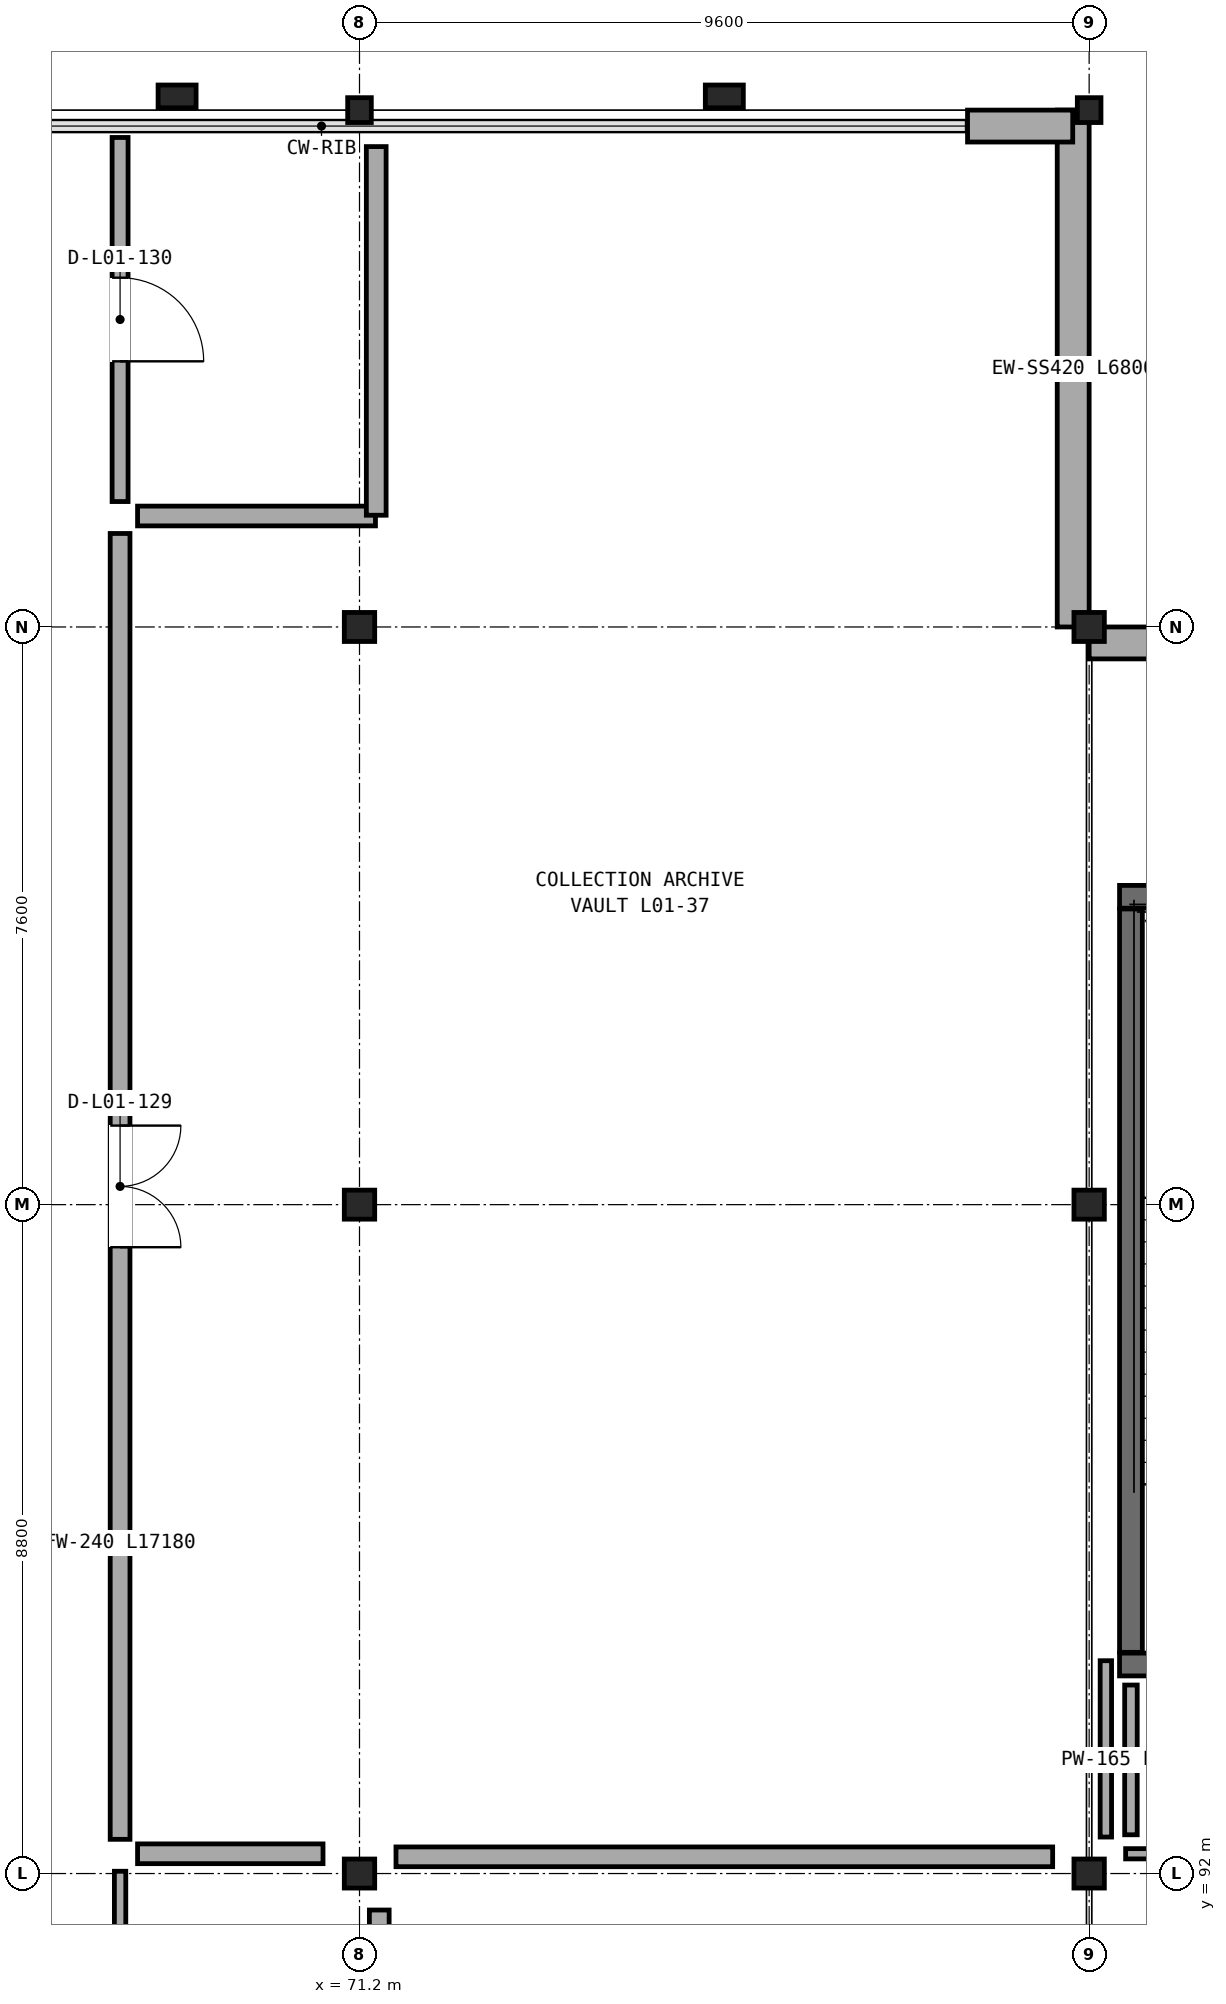
"""IFC4 building model, lengths in metres.
Left out: names, types, materials, properties, quantities, classifications, styles, units other than length and angle.
Written with IfcOpenShell. Run it as: python <this file> out.ifc"""

import sys

from ifc_helpers import new_model, si_unit, direction, frame, frame_2d, origin, origin_2d, place, context, subcontext, project, spatial, rectangle, i_section, extrude, element, fill, save


model = new_model("IFC4")
c1 = context("Model", 3, precision=1e-05, world=origin(), true_north=direction((0.0, 1.0)))
c2 = subcontext(c1, "Body", "Model", "MODEL_VIEW")
j1 = project(units=[si_unit("LENGTHUNIT", "METRE"), si_unit("PLANEANGLEUNIT", "RADIAN")], contexts=[c1])
p1 = place(None, origin())
s1 = spatial("IfcSite", under=j1, at=p1, CompositionType="ELEMENT")
p2 = place(p1, origin())
s2 = spatial("IfcBuilding", under=s1, at=p2, CompositionType="ELEMENT")
p3 = place(p2, frame((0.0, 0.0, 5.6)))
s3 = spatial("IfcBuildingStorey", under=s2, at=p3, CompositionType="ELEMENT", Elevation=5.6)
for number, where, z_axis, x_axis in (
    (1, (71.2, 92.0, 0.0), (0.0, 0.0, 1.0), (1.0, 0.0, 0.0)),
    (2, (71.2, 100.8, 0.0), (0.0, 0.0, 1.0), (1.0, 0.0, 0.0)),
    (3, (71.2, 108.4, 0.0), (0.0, 0.0, 1.0), (1.0, 0.0, 0.0)),
):
    element("IfcColumn", number, at=place(p3, frame(where, z_axis=z_axis, x_axis=x_axis)), inside=s3, PredefinedType="COLUMN", context=c2, shape_type="SweptSolid", body=[
        extrude(i_section(OverallWidth=0.4, OverallDepth=0.382, WebThickness=0.025, FlangeThickness=0.036, at=origin_2d()), origin(), (0.0, 0.0, 1.0), 4.5),
    ])
p4 = place(p3, frame((71.2, 115.2, 0.0), z_axis=(0.0, 0.0, 1.0), x_axis=(1.0, 0.0, 0.0)))
e4 = element("IfcColumn", 4, at=p4, inside=s3, PredefinedType="COLUMN", context=c2, shape_type="SweptSolid", body=[
    extrude(i_section(OverallWidth=0.311, OverallDepth=0.327, WebThickness=0.016, FlangeThickness=0.025, FilletRadius=0.017, at=origin_2d()), origin(), (0.0, 0.0, 1.0), 4.5),
])
for number, where, z_axis, x_axis in (
    (5, (80.8, 92.0, 0.0), (0.0, 0.0, 1.0), (1.0, 0.0, 0.0)),
    (6, (80.8, 100.8, 0.0), (0.0, 0.0, 1.0), (1.0, 0.0, 0.0)),
    (7, (80.8, 108.4, 0.0), (0.0, 0.0, 1.0), (1.0, 0.0, 0.0)),
):
    element("IfcColumn", number, at=place(p3, frame(where, z_axis=z_axis, x_axis=x_axis)), inside=s3, PredefinedType="COLUMN", context=c2, shape_type="SweptSolid", body=[
        extrude(i_section(OverallWidth=0.4, OverallDepth=0.382, WebThickness=0.025, FlangeThickness=0.036, at=origin_2d()), origin(), (0.0, 0.0, 1.0), 4.5),
    ])
p5 = place(p3, frame((80.8, 115.2, 0.0), z_axis=(0.0, 0.0, 1.0), x_axis=(1.0, 0.0, 0.0)))
e8 = element("IfcColumn", 8, at=p5, inside=s3, PredefinedType="COLUMN", context=c2, shape_type="SweptSolid", body=[
    extrude(i_section(OverallWidth=0.311, OverallDepth=0.327, WebThickness=0.016, FlangeThickness=0.025, FilletRadius=0.017, at=origin_2d()), origin(), (0.0, 0.0, 1.0), 4.5),
])
for number, where, z_axis, x_axis in (
    (9, (68.8, 115.38, 0.0), (0.0, 0.0, 1.0), (1.0, 0.0, 0.0)),
    (10, (76.0, 115.38, 0.0), (0.0, 0.0, 1.0), (1.0, 0.0, 0.0)),
):
    element("IfcColumn", number, at=place(p3, frame(where, z_axis=z_axis, x_axis=x_axis)), inside=s3, PredefinedType="PILASTER", context=c2, shape_type="SweptSolid", body=[
        extrude(rectangle(XDim=0.5, YDim=0.3, at=origin_2d()), origin(), (0.0, 0.0, 1.0), 4.5),
    ])
p6 = place(p3, frame((82.4, 108.19, 0.0), z_axis=(0.0, 0.0, 1.0), x_axis=(-1.0, 0.0, 0.0)))
e11 = element("IfcWall", 11, at=p6, inside=s3, PredefinedType="SOLIDWALL", context=c2, shape_type="SweptSolid", body=[
    extrude(rectangle(XDim=1.6, YDim=0.42, at=frame_2d((0.8, 0.0))), origin(), (0.0, 0.0, 1.0), 3.558),
])
p7 = place(p3, frame((80.59, 108.4, 0.0), z_axis=(0.0, 0.0, 1.0), x_axis=(0.0, 1.0, 0.0)))
e12 = element("IfcWall", 12, at=p7, inside=s3, PredefinedType="SOLIDWALL", context=c2, shape_type="SweptSolid", body=[
    extrude(rectangle(XDim=6.8, YDim=0.42, at=frame_2d((3.4, 0.0))), origin(), (0.0, 0.0, 1.0), 3.558),
])
p8 = place(p3, frame((80.584, 114.99, 0.0), z_axis=(0.0, 0.0, 1.0), x_axis=(-1.0, 0.0, 0.0)))
e13 = element("IfcWall", 13, at=p8, inside=s3, PredefinedType="SOLIDWALL", context=c2, shape_type="SweptSolid", body=[
    extrude(rectangle(XDim=1.384, YDim=0.42, at=frame_2d((0.692, 0.0))), origin(), (0.0, 0.0, 1.0), 3.708),
])
p9 = place(p3, frame((81.2, 94.75, 0.0), z_axis=(0.0, 0.0, 1.0), x_axis=(1.0, 0.0, 0.0)))
e14 = element("IfcWall", 14, at=p9, inside=s3, PredefinedType="SHEAR", context=c2, shape_type="SweptSolid", body=[
    extrude(rectangle(XDim=8.4, YDim=0.3, at=frame_2d((4.2, 0.0))), origin(), (0.0, 0.0, 1.0), 4.245),
])
p10 = place(p9, frame((1.925, 0.0, 0.0)))
e15 = element("IfcOpeningElement", 15, at=p10, cuts=e14, PredefinedType="OPENING", context=c2, shape_type="SweptSolid", body=[
    extrude(rectangle(XDim=1.25, YDim=2.2, at=frame_2d((0.625, 1.1))), frame((0.0, 0.16, 0.0), z_axis=(0.0, -1.0, 0.0), x_axis=(1.0, 0.0, 0.0)), (0.0, 0.0, 1.0), 0.32),
])
p11 = place(p9, frame((6.0, 0.0, 0.0)))
e16 = element("IfcOpeningElement", 16, at=p11, cuts=e14, PredefinedType="OPENING", context=c2, shape_type="SweptSolid", body=[
    extrude(rectangle(XDim=1.1, YDim=2.2, at=frame_2d((0.55, 1.1))), frame((0.0, 0.16, 0.0), z_axis=(0.0, -1.0, 0.0), x_axis=(1.0, 0.0, 0.0)), (0.0, 0.0, 1.0), 0.32),
])
p12 = place(p3, frame((89.6, 104.85, 0.0), z_axis=(0.0, 0.0, 1.0), x_axis=(-1.0, 0.0, 0.0)))
e17 = element("IfcWall", 17, at=p12, inside=s3, PredefinedType="SHEAR", context=c2, shape_type="SweptSolid", body=[
    extrude(rectangle(XDim=8.4, YDim=0.3, at=frame_2d((4.2, 0.0))), origin(), (0.0, 0.0, 1.0), 4.245),
])
p13 = place(p12, frame((1.3, 0.0, 0.0)))
e18 = element("IfcOpeningElement", 18, at=p13, cuts=e17, PredefinedType="OPENING", context=c2, shape_type="SweptSolid", body=[
    extrude(rectangle(XDim=1.1, YDim=2.2, at=frame_2d((0.55, 1.1))), frame((0.0, 0.16, 0.0), z_axis=(0.0, -1.0, 0.0), x_axis=(1.0, 0.0, 0.0)), (0.0, 0.0, 1.0), 0.32),
])
p14 = place(p3, frame((81.35, 104.69, 0.0), z_axis=(0.0, 0.0, 1.0), x_axis=(0.0, -1.0, 0.0)))
e19 = element("IfcWall", 19, at=p14, inside=s3, PredefinedType="SHEAR", context=c2, shape_type="SweptSolid", body=[
    extrude(rectangle(XDim=9.78, YDim=0.3, at=frame_2d((4.89, 0.0))), origin(), (0.0, 0.0, 1.0), 4.245),
])
p15 = place(p3, frame((81.28, 92.26, 0.0), z_axis=(0.0, 0.0, 1.0), x_axis=(1.0, 0.0, 0.0)))
e20 = element("IfcWall", 20, at=p15, inside=s3, PredefinedType="PARTITIONING", context=c2, shape_type="SweptSolid", body=[
    extrude(rectangle(XDim=8.64, YDim=0.135, at=frame_2d((4.32, 0.0))), origin(), (0.0, 0.0, 1.0), 3.613),
])
p16 = place(p3, frame((81.35, 94.48, 0.0), z_axis=(0.0, 0.0, 1.0), x_axis=(0.0, -1.0, 0.0)))
e21 = element("IfcWall", 21, at=p16, inside=s3, PredefinedType="PARTITIONING", context=c2, shape_type="SweptSolid", body=[
    extrude(rectangle(XDim=1.97, YDim=0.165, at=frame_2d((0.985, 0.0))), origin(), (0.0, 0.0, 1.0), 4.13),
])
p17 = place(p3, frame((81.02, 92.48, 0.0), z_axis=(0.0, 0.0, 1.0), x_axis=(0.0, 1.0, 0.0)))
e22 = element("IfcWall", 22, at=p17, inside=s3, PredefinedType="PARTITIONING", context=c2, shape_type="SweptSolid", body=[
    extrude(rectangle(XDim=2.32, YDim=0.15, at=frame_2d((1.16, 0.0))), origin(), (0.0, 0.0, 1.0), 3.693),
])
p18 = place(p3, frame((68.05, 79.88, 0.0), z_axis=(0.0, 0.0, 1.0), x_axis=(0.0, 1.0, 0.0)))
e23 = element("IfcWall", 23, at=p18, inside=s3, PredefinedType="PARTITIONING", context=c2, shape_type="SweptSolid", body=[
    extrude(rectangle(XDim=12.15, YDim=0.15, at=frame_2d((6.075, 0.0))), origin(), (0.0, 0.0, 1.0), 3.543),
])
p19 = place(p18, frame((5.595, 0.0, 0.0)))
e24 = element("IfcOpeningElement", 24, at=p19, cuts=e23, PredefinedType="OPENING", context=c2, shape_type="SweptSolid", body=[
    extrude(rectangle(XDim=0.96, YDim=2.24, at=frame_2d((0.48, 1.12))), frame((0.0, 0.085, 0.0), z_axis=(0.0, -1.0, 0.0), x_axis=(1.0, 0.0, 0.0)), (0.0, 0.0, 1.0), 0.17),
])
p20 = place(p3, frame((68.05, 92.45, 0.0), z_axis=(0.0, 0.0, 1.0), x_axis=(0.0, 1.0, 0.0)))
e25 = element("IfcWall", 25, at=p20, inside=s3, PredefinedType="SOLIDWALL", context=c2, shape_type="SweptSolid", body=[
    extrude(rectangle(XDim=17.18, YDim=0.26, at=frame_2d((8.59, 0.0))), origin(), (0.0, 0.0, 1.0), 3.543),
])
p21 = place(p20, frame((7.79, 0.0, 0.0)))
e26 = element("IfcOpeningElement", 26, at=p21, cuts=e25, PredefinedType="OPENING", context=c2, shape_type="SweptSolid", body=[
    extrude(rectangle(XDim=1.6, YDim=2.4, at=frame_2d((0.8, 1.2))), frame((0.0, 0.14, 0.0), z_axis=(0.0, -1.0, 0.0), x_axis=(1.0, 0.0, 0.0)), (0.0, 0.0, 1.0), 0.28),
])
p22 = place(p3, frame((68.05, 110.05, 0.0), z_axis=(0.0, 0.0, 1.0), x_axis=(0.0, 1.0, 0.0)))
e27 = element("IfcWall", 27, at=p22, inside=s3, PredefinedType="PARTITIONING", context=c2, shape_type="SweptSolid", body=[
    extrude(rectangle(XDim=4.79, YDim=0.21, at=frame_2d((2.395, 0.0))), origin(), (0.0, 0.0, 1.0), 2.9),
])
p23 = place(p22, frame((1.845, 0.0, 0.0)))
e28 = element("IfcOpeningElement", 28, at=p23, cuts=e27, PredefinedType="OPENING", context=c2, shape_type="SweptSolid", body=[
    extrude(rectangle(XDim=1.1, YDim=2.24, at=frame_2d((0.55, 1.12))), frame((0.0, 0.115, 0.0), z_axis=(0.0, -1.0, 0.0), x_axis=(1.0, 0.0, 0.0)), (0.0, 0.0, 1.0), 0.23),
])
p24 = place(p3, frame((68.28, 92.26, 0.0), z_axis=(0.0, 0.0, 1.0), x_axis=(1.0, 0.0, 0.0)))
e29 = element("IfcWall", 29, at=p24, inside=s3, PredefinedType="SOLIDWALL", context=c2, shape_type="SweptSolid", body=[
    extrude(rectangle(XDim=2.44, YDim=0.26, at=frame_2d((1.22, 0.0))), origin(), (0.0, 0.0, 1.0), 3.543),
])
p25 = place(p3, frame((71.46, 91.52, 0.0), z_axis=(0.0, 0.0, 1.0), x_axis=(0.0, -1.0, 0.0)))
e30 = element("IfcWall", 30, at=p25, inside=s3, PredefinedType="SOLIDWALL", context=c2, shape_type="SweptSolid", body=[
    extrude(rectangle(XDim=11.64, YDim=0.26, at=frame_2d((5.82, 0.0))), origin(), (0.0, 0.0, 1.0), 3.543),
])
p26 = place(p3, frame((68.28, 109.86, 0.0), z_axis=(0.0, 0.0, 1.0), x_axis=(1.0, 0.0, 0.0)))
e31 = element("IfcWall", 31, at=p26, inside=s3, PredefinedType="SOLIDWALL", context=c2, shape_type="SweptSolid", body=[
    extrude(rectangle(XDim=3.13, YDim=0.26, at=frame_2d((1.565, 0.0))), origin(), (0.0, 0.0, 1.0), 3.693),
])
p27 = place(p3, frame((71.42, 109.87, 0.0), z_axis=(0.0, 0.0, 1.0), x_axis=(0.0, 1.0, 0.0)))
e32 = element("IfcWall", 32, at=p27, inside=s3, PredefinedType="SOLIDWALL", context=c2, shape_type="SweptSolid", body=[
    extrude(rectangle(XDim=4.85, YDim=0.26, at=frame_2d((2.425, 0.0))), origin(), (0.0, 0.0, 1.0), 2.9),
])
p28 = place(p3, frame((80.32, 92.22, 0.0), z_axis=(0.0, 0.0, 1.0), x_axis=(-1.0, 0.0, 0.0)))
e33 = element("IfcWall", 33, at=p28, inside=s3, PredefinedType="SOLIDWALL", context=c2, shape_type="SweptSolid", body=[
    extrude(rectangle(XDim=8.64, YDim=0.26, at=frame_2d((4.32, 0.0))), origin(), (0.0, 0.0, 1.0), 3.543),
])
p29 = place(p21, frame((1.6, 0.0, 0.0), z_axis=(0.0, 0.0, 1.0), x_axis=(-1.0, 0.0, 0.0)))
e34 = element("IfcDoor", 34, at=p29, inside=s3, OperationType="DOUBLE_DOOR_SINGLE_SWING", PredefinedType="DOOR", context=c2, shape_type="SweptSolid", body=[
    extrude(rectangle(XDim=1.6, YDim=2.4, at=frame_2d((0.8, 1.2))), frame((0.0, 0.025, 0.0), z_axis=(0.0, -1.0, 0.0), x_axis=(1.0, 0.0, 0.0)), (0.0, 0.0, 1.0), 0.05),
])
fill(e26, e34)
p30 = place(p23, frame((1.1, 0.0, 0.0), z_axis=(0.0, 0.0, 1.0), x_axis=(-1.0, 0.0, 0.0)))
e35 = element("IfcDoor", 35, at=p30, inside=s3, OperationType="SINGLE_SWING_LEFT", PredefinedType="DOOR", context=c2, shape_type="SweptSolid", body=[
    extrude(rectangle(XDim=1.1, YDim=2.24, at=frame_2d((0.55, 1.12))), frame((0.0, 0.025, 0.0), z_axis=(0.0, -1.0, 0.0), x_axis=(1.0, 0.0, 0.0)), (0.0, 0.0, 1.0), 0.05),
])
fill(e28, e35)
save(model, sys.argv[1])
